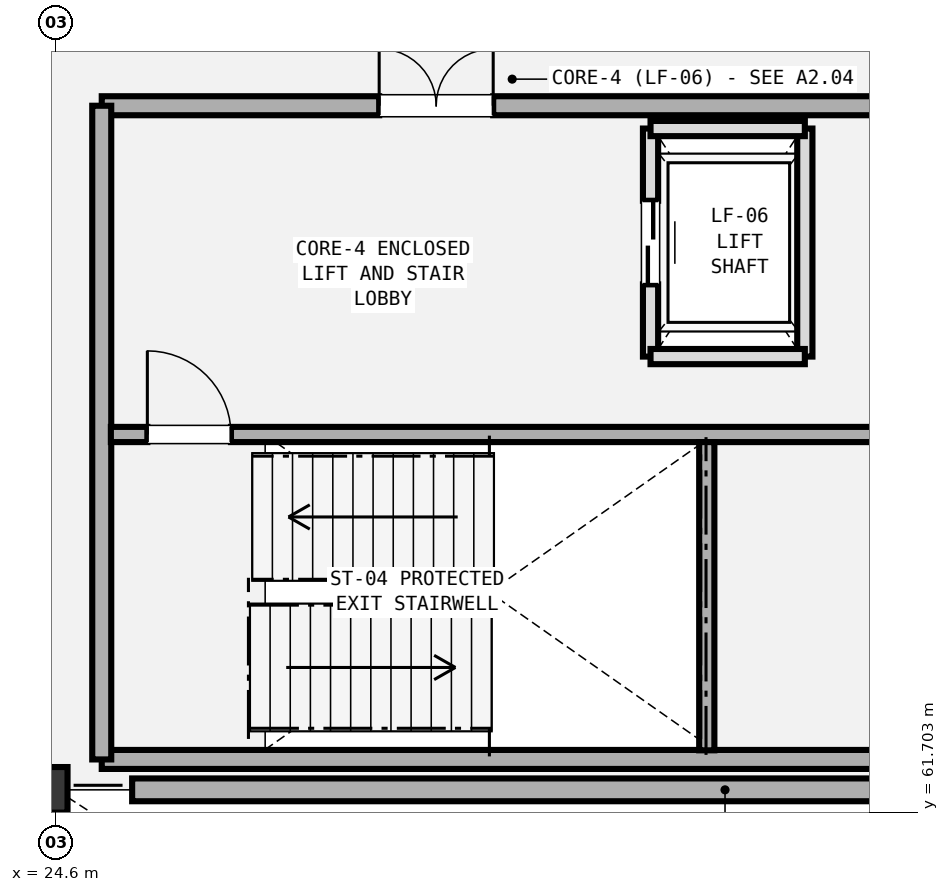
"""IFC4 building model, lengths in metres.
Left out: names, types, materials, properties, quantities, classifications, styles, units other than length and angle.
Written with IfcOpenShell. Run it as: python <this file> out.ifc"""

import sys

from ifc_helpers import new_model, si_unit, direction, frame, frame_2d, origin, origin_2d, place, context, subcontext, project, spatial, rectangle, i_section, extrude, element, fill, save


model = new_model("IFC4")
c1 = context("Model", 3, precision=1e-05, world=origin(), true_north=direction((0.0, 1.0)))
c2 = subcontext(c1, "Body", "Model", "MODEL_VIEW")
j1 = project(units=[si_unit("LENGTHUNIT", "METRE"), si_unit("PLANEANGLEUNIT", "RADIAN")], contexts=[c1])
p1 = place(None, origin())
s1 = spatial("IfcSite", under=j1, at=p1, CompositionType="ELEMENT")
p2 = place(p1, origin())
s2 = spatial("IfcBuilding", under=s1, at=p2, CompositionType="ELEMENT")
p3 = place(p2, frame((0.0, 0.0, 5.4)))
s3 = spatial("IfcBuildingStorey", under=s2, at=p3, CompositionType="ELEMENT", Elevation=5.4)
p4 = place(p3, frame((24.6, 62.0, 0.0), z_axis=(0.0, 0.0, 1.0), x_axis=(1.0, 0.0, 0.0)))
e1 = element("IfcColumn", 1, at=p4, inside=s3, PredefinedType="COLUMN", context=c2, shape_type="SweptSolid", body=[
    extrude(i_section(OverallWidth=0.3, OverallDepth=0.6, WebThickness=0.015, FlangeThickness=0.03, FilletRadius=0.027, at=origin_2d()), origin(), (0.0, 0.0, 1.0), 4.2),
])
p5 = place(p3, frame((25.6, 62.0, 0.0), z_axis=(0.0, 0.0, 1.0), x_axis=(1.0, 0.0, 0.0)))
e2 = element("IfcWall", 2, at=p5, inside=s3, PredefinedType="SHEAR", context=c2, shape_type="SweptSolid", body=[
    extrude(rectangle(XDim=15.6, YDim=0.3, at=frame_2d((7.8, 0.0))), origin(), (0.0, 0.0, 1.0), 3.7),
])
p6 = place(p3, frame((25.2, 62.4, 0.0), z_axis=(0.0, 0.0, 1.0), x_axis=(1.0, 0.0, 0.0)))
e3 = element("IfcWall", 3, at=p6, inside=s3, PredefinedType="SHEAR", context=c2, shape_type="SweptSolid", body=[
    extrude(rectangle(XDim=10.8, YDim=0.25, at=frame_2d((5.4, 0.0))), origin(), (0.0, 0.0, 1.0), 3.88),
])
p7 = place(p3, frame((25.2, 71.0, 0.0), z_axis=(0.0, 0.0, 1.0), x_axis=(1.0, 0.0, 0.0)))
e4 = element("IfcWall", 4, at=p7, inside=s3, PredefinedType="SHEAR", context=c2, shape_type="SweptSolid", body=[
    extrude(rectangle(XDim=10.8, YDim=0.25, at=frame_2d((5.4, 0.0))), origin(), (0.0, 0.0, 1.0), 3.88),
])
p8 = place(p7, frame((3.65, 0.0, 0.0)))
e5 = element("IfcOpeningElement", 5, at=p8, cuts=e4, PredefinedType="OPENING", context=c2, shape_type="SweptSolid", body=[
    extrude(rectangle(XDim=1.5, YDim=2.2, at=frame_2d((0.75, 1.1))), frame((0.0, 0.135, 0.0), z_axis=(0.0, -1.0, 0.0), x_axis=(1.0, 0.0, 0.0)), (0.0, 0.0, 1.0), 0.27),
])
p9 = place(p3, frame((25.2, 62.4, 0.0), z_axis=(0.0, 0.0, 1.0), x_axis=(0.0, 1.0, 0.0)))
e6 = element("IfcWall", 6, at=p9, inside=s3, PredefinedType="SHEAR", context=c2, shape_type="SweptSolid", body=[
    extrude(rectangle(XDim=8.6, YDim=0.25, at=frame_2d((4.3, 0.0))), origin(), (0.0, 0.0, 1.0), 3.88),
])
p10 = place(p3, frame((25.32, 66.675, 0.0), z_axis=(0.0, 0.0, 1.0), x_axis=(1.0, 0.0, 0.0)))
e7 = element("IfcWall", 7, at=p10, inside=s3, PredefinedType="SHEAR", context=c2, shape_type="SweptSolid", body=[
    extrude(rectangle(XDim=10.56, YDim=0.2, at=frame_2d((5.28, 0.0))), origin(), (0.0, 0.0, 1.0), 3.88),
])
p11 = place(p10, frame((0.48, 0.0, 0.0)))
e8 = element("IfcOpeningElement", 8, at=p11, cuts=e7, PredefinedType="OPENING", context=c2, shape_type="SweptSolid", body=[
    extrude(rectangle(XDim=1.1, YDim=2.2, at=frame_2d((0.55, 1.1))), frame((0.0, 0.11, 0.0), z_axis=(0.0, -1.0, 0.0), x_axis=(1.0, 0.0, 0.0)), (0.0, 0.0, 1.0), 0.22),
])
p12 = place(p3, frame((33.16, 62.52, 0.0), z_axis=(0.0, 0.0, 1.0), x_axis=(0.0, 1.0, 0.0)))
e9 = element("IfcWall", 9, at=p12, inside=s3, PredefinedType="SHEAR", context=c2, shape_type="SweptSolid", body=[
    extrude(rectangle(XDim=4.055, YDim=0.2, at=frame_2d((2.027, 0.0))), origin(), (0.0, 0.0, 1.0), 3.88),
])
p13 = place(p3, frame((32.42, 67.7, 0.0), z_axis=(0.0, 0.0, 1.0), x_axis=(0.0, 1.0, 0.0)))
e10 = element("IfcWall", 10, at=p13, inside=s3, PredefinedType="SOLIDWALL", context=c2, shape_type="SweptSolid", body=[
    extrude(rectangle(XDim=3.0, YDim=0.2, at=frame_2d((1.5, 0.0))), origin(), (0.0, 0.0, 1.0), 3.88),
])
p14 = place(p13, frame((0.95, 0.0, 0.0)))
e11 = element("IfcOpeningElement", 11, at=p14, cuts=e10, PredefinedType="OPENING", context=c2, shape_type="SweptSolid", body=[
    extrude(rectangle(XDim=1.1, YDim=2.2, at=frame_2d((0.55, 1.1))), frame((0.0, 0.11, 0.0), z_axis=(0.0, -1.0, 0.0), x_axis=(1.0, 0.0, 0.0)), (0.0, 0.0, 1.0), 0.22),
])
p15 = place(p3, frame((34.45, 67.7, 0.0), z_axis=(0.0, 0.0, 1.0), x_axis=(0.0, 1.0, 0.0)))
e12 = element("IfcWall", 12, at=p15, inside=s3, PredefinedType="SOLIDWALL", context=c2, shape_type="SweptSolid", body=[
    extrude(rectangle(XDim=3.0, YDim=0.2, at=frame_2d((1.5, 0.0))), origin(), (0.0, 0.0, 1.0), 3.88),
])
for number, where, z_axis, x_axis in (
    (13, (32.42, 67.7, 0.0), (0.0, 0.0, 1.0), (1.0, 0.0, 0.0)),
    (14, (32.42, 70.7, 0.0), (0.0, 0.0, 1.0), (1.0, 0.0, 0.0)),
):
    element("IfcWall", number, at=place(p3, frame(where, z_axis=z_axis, x_axis=x_axis)), inside=s3, PredefinedType="SOLIDWALL", context=c2, shape_type="SweptSolid", body=[
        extrude(rectangle(XDim=2.03, YDim=0.2, at=frame_2d((1.015, 0.0))), origin(), (0.0, 0.0, 1.0), 3.88),
    ])
p16 = place(p8, origin())
e15 = element("IfcDoor", 15, at=p16, inside=s3, OperationType="DOUBLE_DOOR_SINGLE_SWING", PredefinedType="DOOR", context=c2, shape_type="SweptSolid", body=[
    extrude(rectangle(XDim=1.5, YDim=2.2, at=frame_2d((0.75, 1.1))), frame((0.0, 0.025, 0.0), z_axis=(0.0, -1.0, 0.0), x_axis=(1.0, 0.0, 0.0)), (0.0, 0.0, 1.0), 0.05),
])
fill(e5, e15)
p17 = place(p11, origin())
e16 = element("IfcDoor", 16, at=p17, inside=s3, OperationType="SINGLE_SWING_LEFT", PredefinedType="DOOR", context=c2, shape_type="SweptSolid", body=[
    extrude(rectangle(XDim=1.1, YDim=2.2, at=frame_2d((0.55, 1.1))), frame((0.0, 0.025, 0.0), z_axis=(0.0, -1.0, 0.0), x_axis=(1.0, 0.0, 0.0)), (0.0, 0.0, 1.0), 0.05),
])
fill(e8, e16)
p18 = place(p14, origin())
e17 = element("IfcDoor", 17, at=p18, inside=s3, OperationType="DOUBLE_DOOR_SLIDING", PredefinedType="DOOR", context=c2, shape_type="SweptSolid", body=[
    extrude(rectangle(XDim=1.1, YDim=2.2, at=frame_2d((0.55, 1.1))), frame((0.0, 0.025, 0.0), z_axis=(0.0, -1.0, 0.0), x_axis=(1.0, 0.0, 0.0)), (0.0, 0.0, 1.0), 0.05),
])
fill(e11, e17)
save(model, sys.argv[1])
